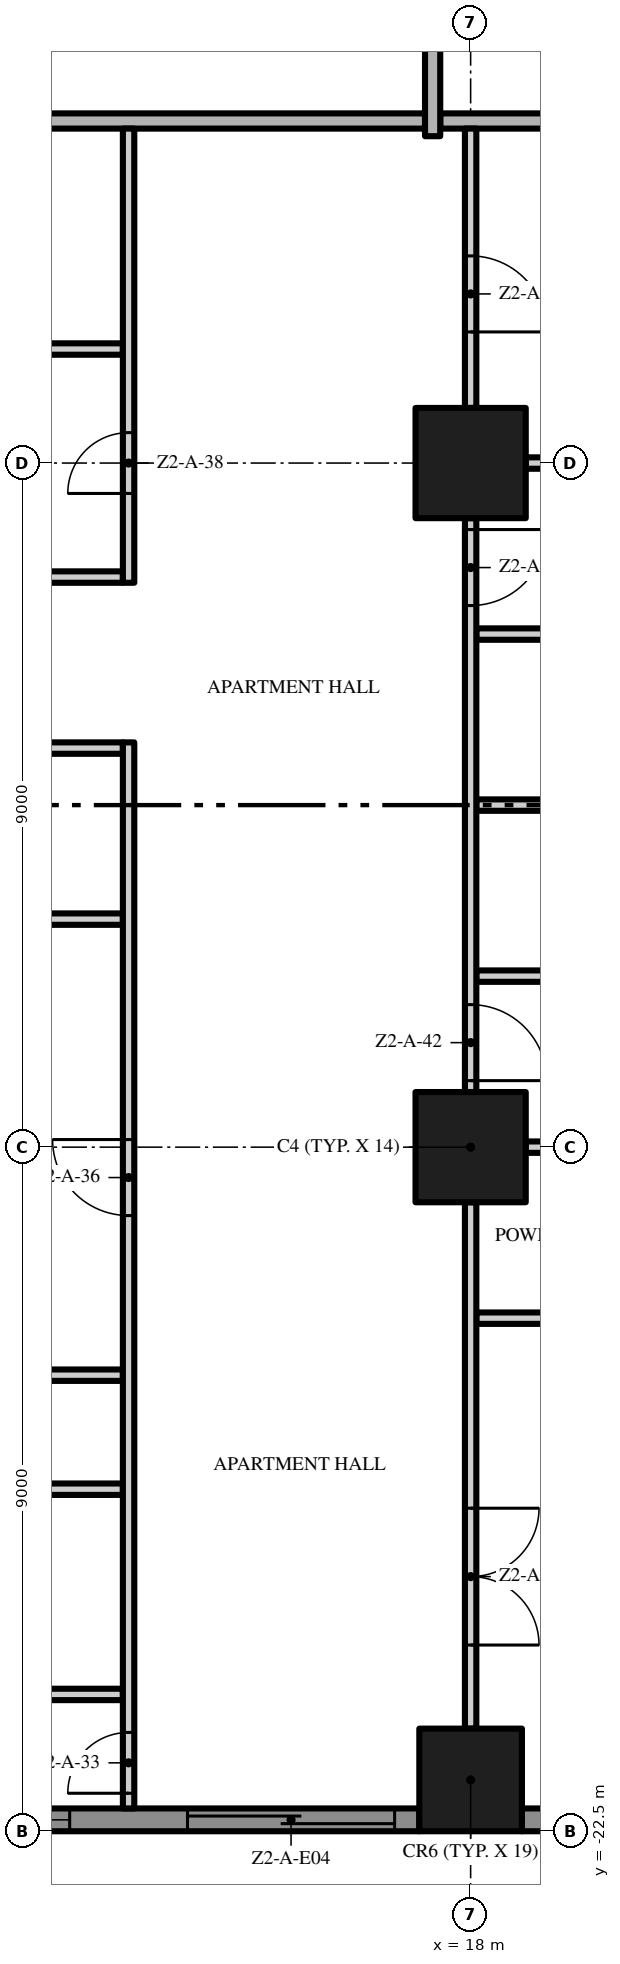
"""IFC4 building model, lengths in metres.
Left out: names, types, materials, properties, quantities, classifications, styles, units other than length and angle.
Written with IfcOpenShell. Run it as: python <this file> out.ifc"""

import sys

from ifc_helpers import new_model, si_unit, direction, frame, frame_2d, origin, origin_2d, place, context, subcontext, project, spatial, polyline, rectangle, outline, extrude, element, fill, save


model = new_model("IFC4")
c1 = context("Model", 3, precision=1e-05, world=origin(), true_north=direction((0.0, 1.0)))
c2 = subcontext(c1, "Body", "Model", "MODEL_VIEW")
j1 = project(units=[si_unit("LENGTHUNIT", "METRE"), si_unit("PLANEANGLEUNIT", "RADIAN")], contexts=[c1])
p1 = place(None, origin())
s1 = spatial("IfcSite", under=j1, at=p1, CompositionType="ELEMENT")
p2 = place(p1, origin())
s2 = spatial("IfcBuilding", under=s1, at=p2, CompositionType="ELEMENT")
p3 = place(p2, frame((0.0, 0.0, 69.4)))
s3 = spatial("IfcBuildingStorey", under=s2, at=p3, CompositionType="ELEMENT", Elevation=69.4)
p4 = place(p3, frame((18.0, -13.5, 0.0), z_axis=(0.0, 0.0, 1.0), x_axis=(1.0, 0.0, 0.0)))
e1 = element("IfcColumn", 1, at=p4, inside=s3, PredefinedType="COLUMN", context=c2, shape_type="SweptSolid", body=[
    extrude(rectangle(XDim=1.45, YDim=1.45, at=origin_2d()), origin(), (0.0, 0.0, 1.0), 3.5),
])
p5 = place(p3, frame((18.0, -21.825, 0.0), z_axis=(0.0, 0.0, 1.0), x_axis=(1.0, 0.0, 0.0)))
e2 = element("IfcColumn", 2, at=p5, inside=s3, PredefinedType="COLUMN", context=c2, shape_type="SweptSolid", body=[
    extrude(rectangle(XDim=1.35, YDim=1.35, at=origin_2d()), origin(), (0.0, 0.0, 1.0), 3.5),
])
p6 = place(p3, frame((18.0, -4.5, 0.0), z_axis=(0.0, 0.0, 1.0), x_axis=(1.0, 0.0, 0.0)))
e3 = element("IfcColumn", 3, at=p6, inside=s3, PredefinedType="COLUMN", context=c2, shape_type="SweptSolid", body=[
    extrude(rectangle(XDim=1.45, YDim=1.45, at=origin_2d()), origin(), (0.0, 0.0, 1.0), 3.5),
])
p7 = place(p3, frame((17.325, -22.35, 0.0), z_axis=(0.0, 0.0, 1.0), x_axis=(-1.0, 0.0, 0.0)))
e4 = element("IfcWall", 4, at=p7, inside=s3, PredefinedType="SOLIDWALL", context=c2, shape_type="SweptSolid", body=[
    extrude(rectangle(XDim=7.65, YDim=0.3, at=frame_2d((3.825, 0.0))), origin(), (0.0, 0.0, 1.0), 3.5),
])
p8 = place(p7, frame((4.6, 0.0, 0.45)))
e5 = element("IfcOpeningElement", 5, at=p8, cuts=e4, PredefinedType="OPENING", context=c2, shape_type="SweptSolid", body=[
    extrude(rectangle(XDim=2.725, YDim=2.65, at=frame_2d((1.363, 1.325))), frame((0.0, 0.16, 0.0), z_axis=(0.0, -1.0, 0.0), x_axis=(1.0, 0.0, 0.0)), (0.0, 0.0, 1.0), 0.32),
])
p9 = place(p7, frame((0.325, 0.0, 0.0)))
e6 = element("IfcOpeningElement", 6, at=p9, cuts=e4, PredefinedType="OPENING", context=c2, shape_type="SweptSolid", body=[
    extrude(rectangle(XDim=2.725, YDim=2.4, at=frame_2d((1.363, 1.2))), frame((0.0, 0.16, 0.0), z_axis=(0.0, -1.0, 0.0), x_axis=(1.0, 0.0, 0.0)), (0.0, 0.0, 1.0), 0.32),
])
p10 = place(p3, frame((22.5, -22.35, 0.0), z_axis=(0.0, 0.0, 1.0), x_axis=(-1.0, 0.0, 0.0)))
e7 = element("IfcWall", 7, at=p10, inside=s3, PredefinedType="SOLIDWALL", context=c2, shape_type="SweptSolid", body=[
    extrude(rectangle(XDim=3.825, YDim=0.3, at=frame_2d((1.913, 0.0))), origin(), (0.0, 0.0, 1.0), 3.5),
])
p11 = place(p10, frame((0.775, 0.0, 0.45)))
e8 = element("IfcOpeningElement", 8, at=p11, cuts=e7, PredefinedType="OPENING", context=c2, shape_type="SweptSolid", body=[
    extrude(rectangle(XDim=2.725, YDim=2.65, at=frame_2d((1.363, 1.325))), frame((0.0, 0.16, 0.0), z_axis=(0.0, -1.0, 0.0), x_axis=(1.0, 0.0, 0.0)), (0.0, 0.0, 1.0), 0.32),
])
p12 = place(p3, origin())
e9 = element("IfcWall", 9, at=p12, inside=s3, PredefinedType="USERDEFINED", context=c2, shape_type="SweptSolid", body=[
    extrude(outline(polyline([(-22.5, -23.1), (-21.0, -23.329), (-19.5, -23.929), (-18.0, -24.671), (-16.5, -25.271), (-15.0, -25.5), (-13.5, -25.271), (-12.0, -24.671), (-10.5, -23.929), (-9.0, -23.329), (-7.5, -23.1), (-6.0, -23.329), (-4.5, -23.929), (-3.0, -24.671), (-1.5, -25.271), (0.0, -25.5), (1.5, -25.271), (3.0, -24.671), (4.5, -23.929), (6.0, -23.329), (7.5, -23.1), (9.0, -23.329), (10.5, -23.929), (12.0, -24.671), (13.5, -25.271), (15.0, -25.5), (16.5, -25.271), (18.0, -24.671), (19.5, -23.929), (21.0, -23.329), (22.5, -23.1), (22.462, -22.853), (20.934, -23.086), (19.398, -23.701), (17.898, -24.442), (16.434, -25.028), (15.0, -25.247), (13.566, -25.028), (12.102, -24.442), (10.602, -23.701), (9.066, -23.086), (7.5, -22.847), (5.934, -23.086), (4.398, -23.701), (2.898, -24.442), (1.434, -25.028), (0.0, -25.247), (-1.434, -25.028), (-2.898, -24.442), (-4.398, -23.701), (-5.934, -23.086), (-7.5, -22.847), (-9.066, -23.086), (-10.602, -23.701), (-12.102, -24.442), (-13.566, -25.028), (-15.0, -25.247), (-16.434, -25.028), (-17.898, -24.442), (-19.398, -23.701), (-20.934, -23.086), (-22.462, -22.853), (-22.5, -23.1)])), origin(), (0.0, 0.0, 1.0), 0.9),
])
for number, where, z_axis, x_axis in (
    (10, (9.075, -20.7, 0.0), (0.0, 0.0, 1.0), (1.0, 0.0, 0.0)),
    (11, (9.075, -18.0, 0.0), (0.0, 0.0, 1.0), (1.0, 0.0, 0.0)),
    (12, (9.075, -16.5, 0.0), (0.0, 0.0, 1.0), (1.0, 0.0, 0.0)),
):
    element("IfcWall", number, at=place(p3, frame(where, z_axis=z_axis, x_axis=x_axis)), inside=s3, PredefinedType="PARTITIONING", context=c2, shape_type="SweptSolid", body=[
        extrude(rectangle(XDim=4.35, YDim=0.15, at=frame_2d((2.175, 0.0))), origin(), (0.0, 0.0, 1.0), 3.5),
    ])
p13 = place(p3, frame((18.075, -15.75, 0.0), z_axis=(0.0, 0.0, 1.0), x_axis=(1.0, 0.0, 0.0)))
e13 = element("IfcWall", 13, at=p13, inside=s3, PredefinedType="PARTITIONING", context=c2, shape_type="SweptSolid", body=[
    extrude(rectangle(XDim=2.85, YDim=0.15, at=frame_2d((1.425, 0.0))), origin(), (0.0, 0.0, 1.0), 3.5),
])
p14 = place(p3, frame((18.725, -13.5, 0.0), z_axis=(0.0, 0.0, 1.0), x_axis=(1.0, 0.0, 0.0)))
e14 = element("IfcWall", 14, at=p14, inside=s3, PredefinedType="PARTITIONING", context=c2, shape_type="SweptSolid", body=[
    extrude(rectangle(XDim=6.925, YDim=0.15, at=frame_2d((3.462, 0.0))), origin(), (0.0, 0.0, 1.0), 3.5),
])
p15 = place(p3, frame((18.075, -11.25, 0.0), z_axis=(0.0, 0.0, 1.0), x_axis=(1.0, 0.0, 0.0)))
e15 = element("IfcWall", 15, at=p15, inside=s3, PredefinedType="PARTITIONING", context=c2, shape_type="SweptSolid", body=[
    extrude(rectangle(XDim=2.85, YDim=0.15, at=frame_2d((1.425, 0.0))), origin(), (0.0, 0.0, 1.0), 3.5),
])
p16 = place(p3, frame((9.075, -10.5, 0.0), z_axis=(0.0, 0.0, 1.0), x_axis=(1.0, 0.0, 0.0)))
e16 = element("IfcWall", 16, at=p16, inside=s3, PredefinedType="PARTITIONING", context=c2, shape_type="SweptSolid", body=[
    extrude(rectangle(XDim=4.35, YDim=0.15, at=frame_2d((2.175, 0.0))), origin(), (0.0, 0.0, 1.0), 3.5),
])
p17 = place(p3, frame((18.075, -9.0, 0.0), z_axis=(0.0, 0.0, 1.0), x_axis=(1.0, 0.0, 0.0)))
e17 = element("IfcWall", 17, at=p17, inside=s3, PredefinedType="PARTITIONING", context=c2, shape_type="SweptSolid", body=[
    extrude(rectangle(XDim=2.85, YDim=0.15, at=frame_2d((1.425, 0.0))), origin(), (0.0, 0.0, 1.0), 3.5),
])
p18 = place(p3, frame((13.425, -8.25, 0.0), z_axis=(0.0, 0.0, 1.0), x_axis=(-1.0, 0.0, 0.0)))
e18 = element("IfcWall", 18, at=p18, inside=s3, PredefinedType="PARTITIONING", context=c2, shape_type="SweptSolid", body=[
    extrude(rectangle(XDim=4.35, YDim=0.15, at=frame_2d((2.175, 0.0))), origin(), (0.0, 0.0, 1.0), 3.5),
])
p19 = place(p18, frame((1.7, 0.0, 0.0)))
e19 = element("IfcOpeningElement", 19, at=p19, cuts=e18, PredefinedType="OPENING", context=c2, shape_type="SweptSolid", body=[
    extrude(rectangle(XDim=0.9, YDim=2.1, at=frame_2d((0.45, 1.05))), frame((0.0, 0.085, 0.0), z_axis=(0.0, -1.0, 0.0), x_axis=(1.0, 0.0, 0.0)), (0.0, 0.0, 1.0), 0.17),
])
p20 = place(p3, frame((18.075, -6.75, 0.0), z_axis=(0.0, 0.0, 1.0), x_axis=(1.0, 0.0, 0.0)))
e20 = element("IfcWall", 20, at=p20, inside=s3, PredefinedType="PARTITIONING", context=c2, shape_type="SweptSolid", body=[
    extrude(rectangle(XDim=2.85, YDim=0.15, at=frame_2d((1.425, 0.0))), origin(), (0.0, 0.0, 1.0), 3.5),
])
p21 = place(p3, frame((9.075, -6.0, 0.0), z_axis=(0.0, 0.0, 1.0), x_axis=(1.0, 0.0, 0.0)))
e21 = element("IfcWall", 21, at=p21, inside=s3, PredefinedType="PARTITIONING", context=c2, shape_type="SweptSolid", body=[
    extrude(rectangle(XDim=4.35, YDim=0.15, at=frame_2d((2.175, 0.0))), origin(), (0.0, 0.0, 1.0), 3.5),
])
p22 = place(p3, frame((18.725, -4.5, 0.0), z_axis=(0.0, 0.0, 1.0), x_axis=(1.0, 0.0, 0.0)))
e22 = element("IfcWall", 22, at=p22, inside=s3, PredefinedType="PARTITIONING", context=c2, shape_type="SweptSolid", body=[
    extrude(rectangle(XDim=6.925, YDim=0.15, at=frame_2d((3.462, 0.0))), origin(), (0.0, 0.0, 1.0), 3.5),
])
p23 = place(p3, frame((9.075, -3.0, 0.0), z_axis=(0.0, 0.0, 1.0), x_axis=(1.0, 0.0, 0.0)))
e23 = element("IfcWall", 23, at=p23, inside=s3, PredefinedType="PARTITIONING", context=c2, shape_type="SweptSolid", body=[
    extrude(rectangle(XDim=4.35, YDim=0.15, at=frame_2d((2.175, 0.0))), origin(), (0.0, 0.0, 1.0), 3.5),
])
p24 = place(p3, frame((4.6, 0.0, 0.0), z_axis=(0.0, 0.0, 1.0), x_axis=(1.0, 0.0, 0.0)))
e24 = element("IfcWall", 24, at=p24, inside=s3, PredefinedType="PARTITIONING", context=c2, shape_type="SweptSolid", body=[
    extrude(rectangle(XDim=12.8, YDim=0.2, at=frame_2d((6.4, 0.0))), origin(), (0.0, 0.0, 1.0), 3.5),
])
p25 = place(p3, frame((17.6, 0.0, 0.0), z_axis=(0.0, 0.0, 1.0), x_axis=(1.0, 0.0, 0.0)))
e25 = element("IfcWall", 25, at=p25, inside=s3, PredefinedType="PARTITIONING", context=c2, shape_type="SweptSolid", body=[
    extrude(rectangle(XDim=9.1, YDim=0.2, at=frame_2d((4.55, 0.0))), origin(), (0.0, 0.0, 1.0), 3.5),
])
p26 = place(p3, frame((13.5, -22.2, 0.0), z_axis=(0.0, 0.0, 1.0), x_axis=(0.0, 1.0, 0.0)))
e26 = element("IfcWall", 26, at=p26, inside=s3, PredefinedType="PARTITIONING", context=c2, shape_type="SweptSolid", body=[
    extrude(rectangle(XDim=14.025, YDim=0.15, at=frame_2d((7.013, 0.0))), origin(), (0.0, 0.0, 1.0), 3.5),
])
p27 = place(p26, frame((0.2, 0.0, 0.0)))
e27 = element("IfcOpeningElement", 27, at=p27, cuts=e26, PredefinedType="OPENING", context=c2, shape_type="SweptSolid", body=[
    extrude(rectangle(XDim=0.8, YDim=2.0, at=frame_2d((0.4, 1.0))), frame((0.0, 0.085, 0.0), z_axis=(0.0, -1.0, 0.0), x_axis=(1.0, 0.0, 0.0)), (0.0, 0.0, 1.0), 0.17),
])
p28 = place(p26, frame((7.8, 0.0, 0.0)))
e28 = element("IfcOpeningElement", 28, at=p28, cuts=e26, PredefinedType="OPENING", context=c2, shape_type="SweptSolid", body=[
    extrude(rectangle(XDim=1.0, YDim=2.4, at=frame_2d((0.5, 1.2))), frame((0.0, 0.085, 0.0), z_axis=(0.0, -1.0, 0.0), x_axis=(1.0, 0.0, 0.0)), (0.0, 0.0, 1.0), 0.17),
])
p29 = place(p3, frame((13.5, -6.075, 0.0), z_axis=(0.0, 0.0, 1.0), x_axis=(0.0, 1.0, 0.0)))
e29 = element("IfcWall", 29, at=p29, inside=s3, PredefinedType="PARTITIONING", context=c2, shape_type="SweptSolid", body=[
    extrude(rectangle(XDim=5.975, YDim=0.15, at=frame_2d((2.987, 0.0))), origin(), (0.0, 0.0, 1.0), 3.5),
])
p30 = place(p29, frame((1.175, 0.0, 0.0)))
e30 = element("IfcOpeningElement", 30, at=p30, cuts=e29, PredefinedType="OPENING", context=c2, shape_type="SweptSolid", body=[
    extrude(rectangle(XDim=0.8, YDim=2.0, at=frame_2d((0.4, 1.0))), frame((0.0, 0.085, 0.0), z_axis=(0.0, -1.0, 0.0), x_axis=(1.0, 0.0, 0.0)), (0.0, 0.0, 1.0), 0.17),
])
p31 = place(p3, frame((17.5, -0.2, 0.0), z_axis=(0.0, 0.0, 1.0), x_axis=(0.0, 1.0, 0.0)))
e31 = element("IfcWall", 31, at=p31, inside=s3, PredefinedType="PARTITIONING", context=c2, shape_type="SweptSolid", body=[
    extrude(rectangle(XDim=3.975, YDim=0.2, at=frame_2d((1.988, 0.0))), origin(), (0.0, 0.0, 1.0), 3.5),
])
p32 = place(p3, frame((18.0, -14.225, 0.0), z_axis=(0.0, 0.0, 1.0), x_axis=(0.0, -1.0, 0.0)))
e32 = element("IfcWall", 32, at=p32, inside=s3, PredefinedType="PARTITIONING", context=c2, shape_type="SweptSolid", body=[
    extrude(rectangle(XDim=6.925, YDim=0.15, at=frame_2d((3.462, 0.0))), origin(), (0.0, 0.0, 1.0), 3.5),
])
p33 = place(p32, frame((4.025, 0.0, 0.0)))
e33 = element("IfcOpeningElement", 33, at=p33, cuts=e32, PredefinedType="OPENING", context=c2, shape_type="SweptSolid", body=[
    extrude(rectangle(XDim=1.8, YDim=2.4, at=frame_2d((0.9, 1.2))), frame((0.0, 0.085, 0.0), z_axis=(0.0, -1.0, 0.0), x_axis=(1.0, 0.0, 0.0)), (0.0, 0.0, 1.0), 0.17),
])
p34 = place(p3, frame((18.0, -5.225, 0.0), z_axis=(0.0, 0.0, 1.0), x_axis=(0.0, -1.0, 0.0)))
e34 = element("IfcWall", 34, at=p34, inside=s3, PredefinedType="PARTITIONING", context=c2, shape_type="SweptSolid", body=[
    extrude(rectangle(XDim=7.55, YDim=0.15, at=frame_2d((3.775, 0.0))), origin(), (0.0, 0.0, 1.0), 3.5),
])
p35 = place(p34, frame((6.4, 0.0, 0.0)))
e35 = element("IfcOpeningElement", 35, at=p35, cuts=e34, PredefinedType="OPENING", context=c2, shape_type="SweptSolid", body=[
    extrude(rectangle(XDim=1.0, YDim=2.4, at=frame_2d((0.5, 1.2))), frame((0.0, 0.085, 0.0), z_axis=(0.0, -1.0, 0.0), x_axis=(1.0, 0.0, 0.0)), (0.0, 0.0, 1.0), 0.17),
])
p36 = place(p34, frame((0.15, 0.0, 0.0)))
e36 = element("IfcOpeningElement", 36, at=p36, cuts=e34, PredefinedType="OPENING", context=c2, shape_type="SweptSolid", body=[
    extrude(rectangle(XDim=1.0, YDim=2.4, at=frame_2d((0.5, 1.2))), frame((0.0, 0.085, 0.0), z_axis=(0.0, -1.0, 0.0), x_axis=(1.0, 0.0, 0.0)), (0.0, 0.0, 1.0), 0.17),
])
p37 = place(p3, frame((18.0, -0.1, 0.0), z_axis=(0.0, 0.0, 1.0), x_axis=(0.0, -1.0, 0.0)))
e37 = element("IfcWall", 37, at=p37, inside=s3, PredefinedType="PARTITIONING", context=c2, shape_type="SweptSolid", body=[
    extrude(rectangle(XDim=3.675, YDim=0.15, at=frame_2d((1.837, 0.0))), origin(), (0.0, 0.0, 1.0), 3.5),
])
p38 = place(p37, frame((1.675, 0.0, 0.0)))
e38 = element("IfcOpeningElement", 38, at=p38, cuts=e37, PredefinedType="OPENING", context=c2, shape_type="SweptSolid", body=[
    extrude(rectangle(XDim=1.0, YDim=2.4, at=frame_2d((0.5, 1.2))), frame((0.0, 0.085, 0.0), z_axis=(0.0, -1.0, 0.0), x_axis=(1.0, 0.0, 0.0)), (0.0, 0.0, 1.0), 0.17),
])
p39 = place(p8, origin())
e39 = element("IfcWindow", 39, at=p39, inside=s3, PartitioningType="SINGLE_PANEL", PredefinedType="WINDOW", context=c2, shape_type="SweptSolid", body=[
    extrude(rectangle(XDim=2.725, YDim=2.65, at=frame_2d((1.363, 1.325))), frame((0.0, 0.03, 0.0), z_axis=(0.0, -1.0, 0.0), x_axis=(1.0, 0.0, 0.0)), (0.0, 0.0, 1.0), 0.06),
])
fill(e5, e39)
p40 = place(p9, origin())
e40 = element("IfcDoor", 40, at=p40, inside=s3, OperationType="SINGLE_SWING_LEFT", PredefinedType="DOOR", context=c2, shape_type="SweptSolid", body=[
    extrude(rectangle(XDim=2.725, YDim=2.4, at=frame_2d((1.363, 1.2))), frame((0.0, 0.025, 0.0), z_axis=(0.0, -1.0, 0.0), x_axis=(1.0, 0.0, 0.0)), (0.0, 0.0, 1.0), 0.05),
])
fill(e6, e40)
p41 = place(p27, origin())
e41 = element("IfcDoor", 41, at=p41, inside=s3, OperationType="SINGLE_SWING_LEFT", PredefinedType="DOOR", context=c2, shape_type="SweptSolid", body=[
    extrude(rectangle(XDim=0.8, YDim=2.0, at=frame_2d((0.4, 1.0))), frame((0.0, 0.025, 0.0), z_axis=(0.0, -1.0, 0.0), x_axis=(1.0, 0.0, 0.0)), (0.0, 0.0, 1.0), 0.05),
])
fill(e27, e41)
p42 = place(p28, origin())
e42 = element("IfcDoor", 42, at=p42, inside=s3, OperationType="SINGLE_SWING_RIGHT", PredefinedType="DOOR", context=c2, shape_type="SweptSolid", body=[
    extrude(rectangle(XDim=1.0, YDim=2.4, at=frame_2d((0.5, 1.2))), frame((0.0, 0.025, 0.0), z_axis=(0.0, -1.0, 0.0), x_axis=(1.0, 0.0, 0.0)), (0.0, 0.0, 1.0), 0.05),
])
fill(e28, e42)
p43 = place(p30, origin())
e43 = element("IfcDoor", 43, at=p43, inside=s3, OperationType="SINGLE_SWING_LEFT", PredefinedType="DOOR", context=c2, shape_type="SweptSolid", body=[
    extrude(rectangle(XDim=0.8, YDim=2.0, at=frame_2d((0.4, 1.0))), frame((0.0, 0.025, 0.0), z_axis=(0.0, -1.0, 0.0), x_axis=(1.0, 0.0, 0.0)), (0.0, 0.0, 1.0), 0.05),
])
fill(e30, e43)
p44 = place(p33, origin())
e44 = element("IfcDoor", 44, at=p44, inside=s3, OperationType="DOUBLE_DOOR_SINGLE_SWING", PredefinedType="DOOR", context=c2, shape_type="SweptSolid", body=[
    extrude(rectangle(XDim=1.8, YDim=2.4, at=frame_2d((0.9, 1.2))), frame((0.0, 0.025, 0.0), z_axis=(0.0, -1.0, 0.0), x_axis=(1.0, 0.0, 0.0)), (0.0, 0.0, 1.0), 0.05),
])
fill(e33, e44)
p45 = place(p35, origin())
e45 = element("IfcDoor", 45, at=p45, inside=s3, OperationType="SINGLE_SWING_RIGHT", PredefinedType="DOOR", context=c2, shape_type="SweptSolid", body=[
    extrude(rectangle(XDim=1.0, YDim=2.4, at=frame_2d((0.5, 1.2))), frame((0.0, 0.025, 0.0), z_axis=(0.0, -1.0, 0.0), x_axis=(1.0, 0.0, 0.0)), (0.0, 0.0, 1.0), 0.05),
])
fill(e35, e45)
p46 = place(p36, origin())
e46 = element("IfcDoor", 46, at=p46, inside=s3, OperationType="SINGLE_SWING_LEFT", PredefinedType="DOOR", context=c2, shape_type="SweptSolid", body=[
    extrude(rectangle(XDim=1.0, YDim=2.4, at=frame_2d((0.5, 1.2))), frame((0.0, 0.025, 0.0), z_axis=(0.0, -1.0, 0.0), x_axis=(1.0, 0.0, 0.0)), (0.0, 0.0, 1.0), 0.05),
])
fill(e36, e46)
p47 = place(p38, origin())
e47 = element("IfcDoor", 47, at=p47, inside=s3, OperationType="SINGLE_SWING_RIGHT", PredefinedType="DOOR", context=c2, shape_type="SweptSolid", body=[
    extrude(rectangle(XDim=1.0, YDim=2.4, at=frame_2d((0.5, 1.2))), frame((0.0, 0.025, 0.0), z_axis=(0.0, -1.0, 0.0), x_axis=(1.0, 0.0, 0.0)), (0.0, 0.0, 1.0), 0.05),
])
fill(e38, e47)
save(model, sys.argv[1])
